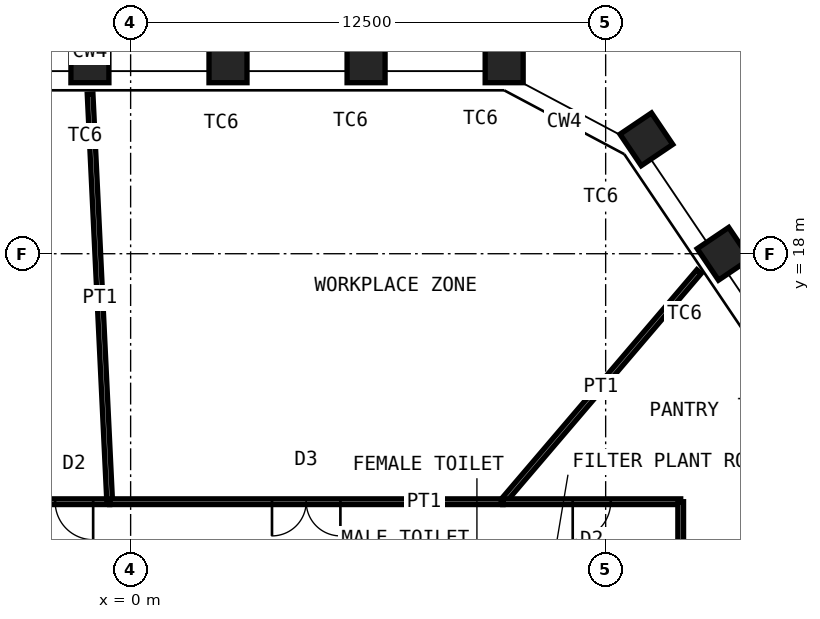
"""IFC4 building model, lengths in metres.
Left out: names, types, materials, properties, quantities, classifications, styles, units other than length and angle.
Written with IfcOpenShell. Run it as: python <this file> out.ifc"""

import sys

from ifc_helpers import new_model, si_unit, direction, frame, frame_2d, origin, origin_2d, place, context, subcontext, project, spatial, rectangle, hollow_rectangle, extrude, element, fill, save


model = new_model("IFC4")
c1 = context("Model", 3, precision=1e-05, world=origin(), true_north=direction((0.0, 1.0)))
c2 = subcontext(c1, "Body", "Model", "MODEL_VIEW")
j1 = project(units=[si_unit("LENGTHUNIT", "METRE"), si_unit("PLANEANGLEUNIT", "RADIAN")], contexts=[c1])
p1 = place(None, origin())
s1 = spatial("IfcSite", under=j1, at=p1, CompositionType="ELEMENT")
p2 = place(p1, origin())
s2 = spatial("IfcBuilding", under=s1, at=p2, CompositionType="ELEMENT")
p3 = place(p2, frame((0.0, 0.0, 243.4)))
s3 = spatial("IfcBuildingStorey", under=s2, at=p3, CompositionType="ELEMENT", Elevation=243.4)
for number, where, z_axis, x_axis in (
    (1, (-1.071, 23.0, 0.0), (0.0, 0.0, 1.0), (-1.0, 0.0, 0.0)),
    (2, (2.562, 23.0, 0.0), (0.0, 0.0, 1.0), (-1.0, 0.0, 0.0)),
    (3, (6.196, 23.0, 0.0), (0.0, 0.0, 1.0), (-1.0, 0.0, 0.0)),
    (4, (9.829, 23.0, 0.0), (0.0, 0.0, 1.0), (-1.0, 0.0, 0.0)),
    (5, (13.571, 21.01, 0.0), (0.0, 0.0, 1.0), (-0.559, 0.829, 0.0)),
    (6, (15.603, 17.998, 0.0), (0.0, 0.0, 1.0), (-0.559, 0.829, 0.0)),
):
    element("IfcColumn", number, at=place(p3, frame(where, z_axis=z_axis, x_axis=x_axis)), inside=s3, PredefinedType="COLUMN", context=c2, shape_type="SweptSolid", body=[
        extrude(hollow_rectangle(XDim=1.0, YDim=1.0, WallThickness=0.06, at=origin_2d()), origin(), (0.0, 0.0, 1.0), 4.2),
    ])
p4 = place(p3, frame((-2.421, 11.475, 0.0), z_axis=(0.0, 0.0, 1.0), x_axis=(1.0, 0.0, 0.0)))
e7 = element("IfcWall", 7, at=p4, inside=s3, PredefinedType="PARTITIONING", context=c2, shape_type="SweptSolid", body=[
    extrude(rectangle(XDim=1.87, YDim=0.15, at=frame_2d((0.935, 0.0))), origin(), (0.0, 0.0, 1.0), 4.03),
])
p5 = place(p4, frame((0.435, 0.0, 0.0)))
e8 = element("IfcOpeningElement", 8, at=p5, cuts=e7, PredefinedType="OPENING", context=c2, shape_type="SweptSolid", body=[
    extrude(rectangle(XDim=1.0, YDim=2.4, at=frame_2d((0.5, 1.2))), frame((0.0, 0.085, 0.0), z_axis=(0.0, -1.0, 0.0), x_axis=(1.0, 0.0, 0.0)), (0.0, 0.0, 1.0), 0.17),
])
p6 = place(p3, frame((-1.067, 22.2, 0.0), z_axis=(0.0, 0.0, 1.0), x_axis=(0.047998335863, -0.998847415652, 0.0)))
e9 = element("IfcWall", 9, at=p6, inside=s3, PredefinedType="PARTITIONING", context=c2, shape_type="SweptSolid", body=[
    extrude(rectangle(XDim=10.738, YDim=0.15, at=frame_2d((5.369, 0.0))), origin(), (0.0, 0.0, 1.0), 3.43),
])
p7 = place(p3, frame((-0.551, 11.475, 0.0), z_axis=(0.0, 0.0, 1.0), x_axis=(1.0, 0.0, 0.0)))
e10 = element("IfcWall", 10, at=p7, inside=s3, PredefinedType="PARTITIONING", context=c2, shape_type="SweptSolid", body=[
    extrude(rectangle(XDim=10.342, YDim=0.15, at=frame_2d((5.171, 0.0))), origin(), (0.0, 0.0, 1.0), 4.03),
])
p8 = place(p7, frame((4.271, 0.0, 0.0)))
e11 = element("IfcOpeningElement", 11, at=p8, cuts=e10, PredefinedType="OPENING", context=c2, shape_type="SweptSolid", body=[
    extrude(rectangle(XDim=1.8, YDim=2.4, at=frame_2d((0.9, 1.2))), frame((0.0, 0.085, 0.0), z_axis=(0.0, -1.0, 0.0), x_axis=(1.0, 0.0, 0.0)), (0.0, 0.0, 1.0), 0.17),
])
p9 = place(p3, frame((14.958, 17.531, 0.0), z_axis=(0.0, 0.0, 1.0), x_axis=(-0.649097500837, -0.760705221756, 0.0)))
e12 = element("IfcWall", 12, at=p9, inside=s3, PredefinedType="PARTITIONING", context=c2, shape_type="SweptSolid", body=[
    extrude(rectangle(XDim=7.96, YDim=0.15, at=frame_2d((3.98, 0.0))), origin(), (0.0, 0.0, 1.0), 3.43),
])
p10 = place(p3, frame((9.791, 11.475, 0.0), z_axis=(0.0, 0.0, 1.0), x_axis=(1.0, 0.0, 0.0)))
e13 = element("IfcWall", 13, at=p10, inside=s3, PredefinedType="PARTITIONING", context=c2, shape_type="SweptSolid", body=[
    extrude(rectangle(XDim=4.684, YDim=0.15, at=frame_2d((2.342, 0.0))), origin(), (0.0, 0.0, 1.0), 4.03),
])
p11 = place(p10, frame((1.842, 0.0, 0.0)))
e14 = element("IfcOpeningElement", 14, at=p11, cuts=e13, PredefinedType="OPENING", context=c2, shape_type="SweptSolid", body=[
    extrude(rectangle(XDim=1.0, YDim=2.4, at=frame_2d((0.5, 1.2))), frame((0.0, 0.085, 0.0), z_axis=(0.0, -1.0, 0.0), x_axis=(1.0, 0.0, 0.0)), (0.0, 0.0, 1.0), 0.17),
])
p12 = place(p3, frame((14.475, 11.475, 0.0), z_axis=(0.0, 0.0, 1.0), x_axis=(0.0, -1.0, 0.0)))
e15 = element("IfcWall", 15, at=p12, inside=s3, PredefinedType="PARTITIONING", context=c2, shape_type="SweptSolid", body=[
    extrude(rectangle(XDim=2.692, YDim=0.15, at=frame_2d((1.346, 0.0))), origin(), (0.0, 0.0, 1.0), 4.03),
])
p13 = place(p3, frame((19.001, 11.53, 0.0), z_axis=(0.0, 0.0, 1.0), x_axis=(-0.854906581035, -0.518781975114, 0.0)))
e16 = element("IfcWall", 16, at=p13, inside=s3, PredefinedType="PARTITIONING", context=c2, shape_type="SweptSolid", body=[
    extrude(rectangle(XDim=5.294, YDim=0.15, at=frame_2d((2.647, 0.0))), origin(), (0.0, 0.0, 1.0), 3.43),
])
p14 = place(p5, origin())
e17 = element("IfcDoor", 17, at=p14, inside=s3, OperationType="SINGLE_SWING_RIGHT", PredefinedType="DOOR", context=c2, shape_type="SweptSolid", body=[
    extrude(rectangle(XDim=1.0, YDim=2.4, at=frame_2d((0.5, 1.2))), frame((0.0, 0.025, 0.0), z_axis=(0.0, -1.0, 0.0), x_axis=(1.0, 0.0, 0.0)), (0.0, 0.0, 1.0), 0.05),
])
fill(e8, e17)
p15 = place(p8, origin())
e18 = element("IfcDoor", 18, at=p15, inside=s3, OperationType="DOUBLE_DOOR_DOUBLE_SWING", PredefinedType="DOOR", context=c2, shape_type="SweptSolid", body=[
    extrude(rectangle(XDim=1.8, YDim=2.4, at=frame_2d((0.9, 1.2))), frame((0.0, 0.025, 0.0), z_axis=(0.0, -1.0, 0.0), x_axis=(1.0, 0.0, 0.0)), (0.0, 0.0, 1.0), 0.05),
])
fill(e11, e18)
p16 = place(p11, origin())
e19 = element("IfcDoor", 19, at=p16, inside=s3, OperationType="SINGLE_SWING_LEFT", PredefinedType="DOOR", context=c2, shape_type="SweptSolid", body=[
    extrude(rectangle(XDim=1.0, YDim=2.4, at=frame_2d((0.5, 1.2))), frame((0.0, 0.025, 0.0), z_axis=(0.0, -1.0, 0.0), x_axis=(1.0, 0.0, 0.0)), (0.0, 0.0, 1.0), 0.05),
])
fill(e14, e19)
save(model, sys.argv[1])
